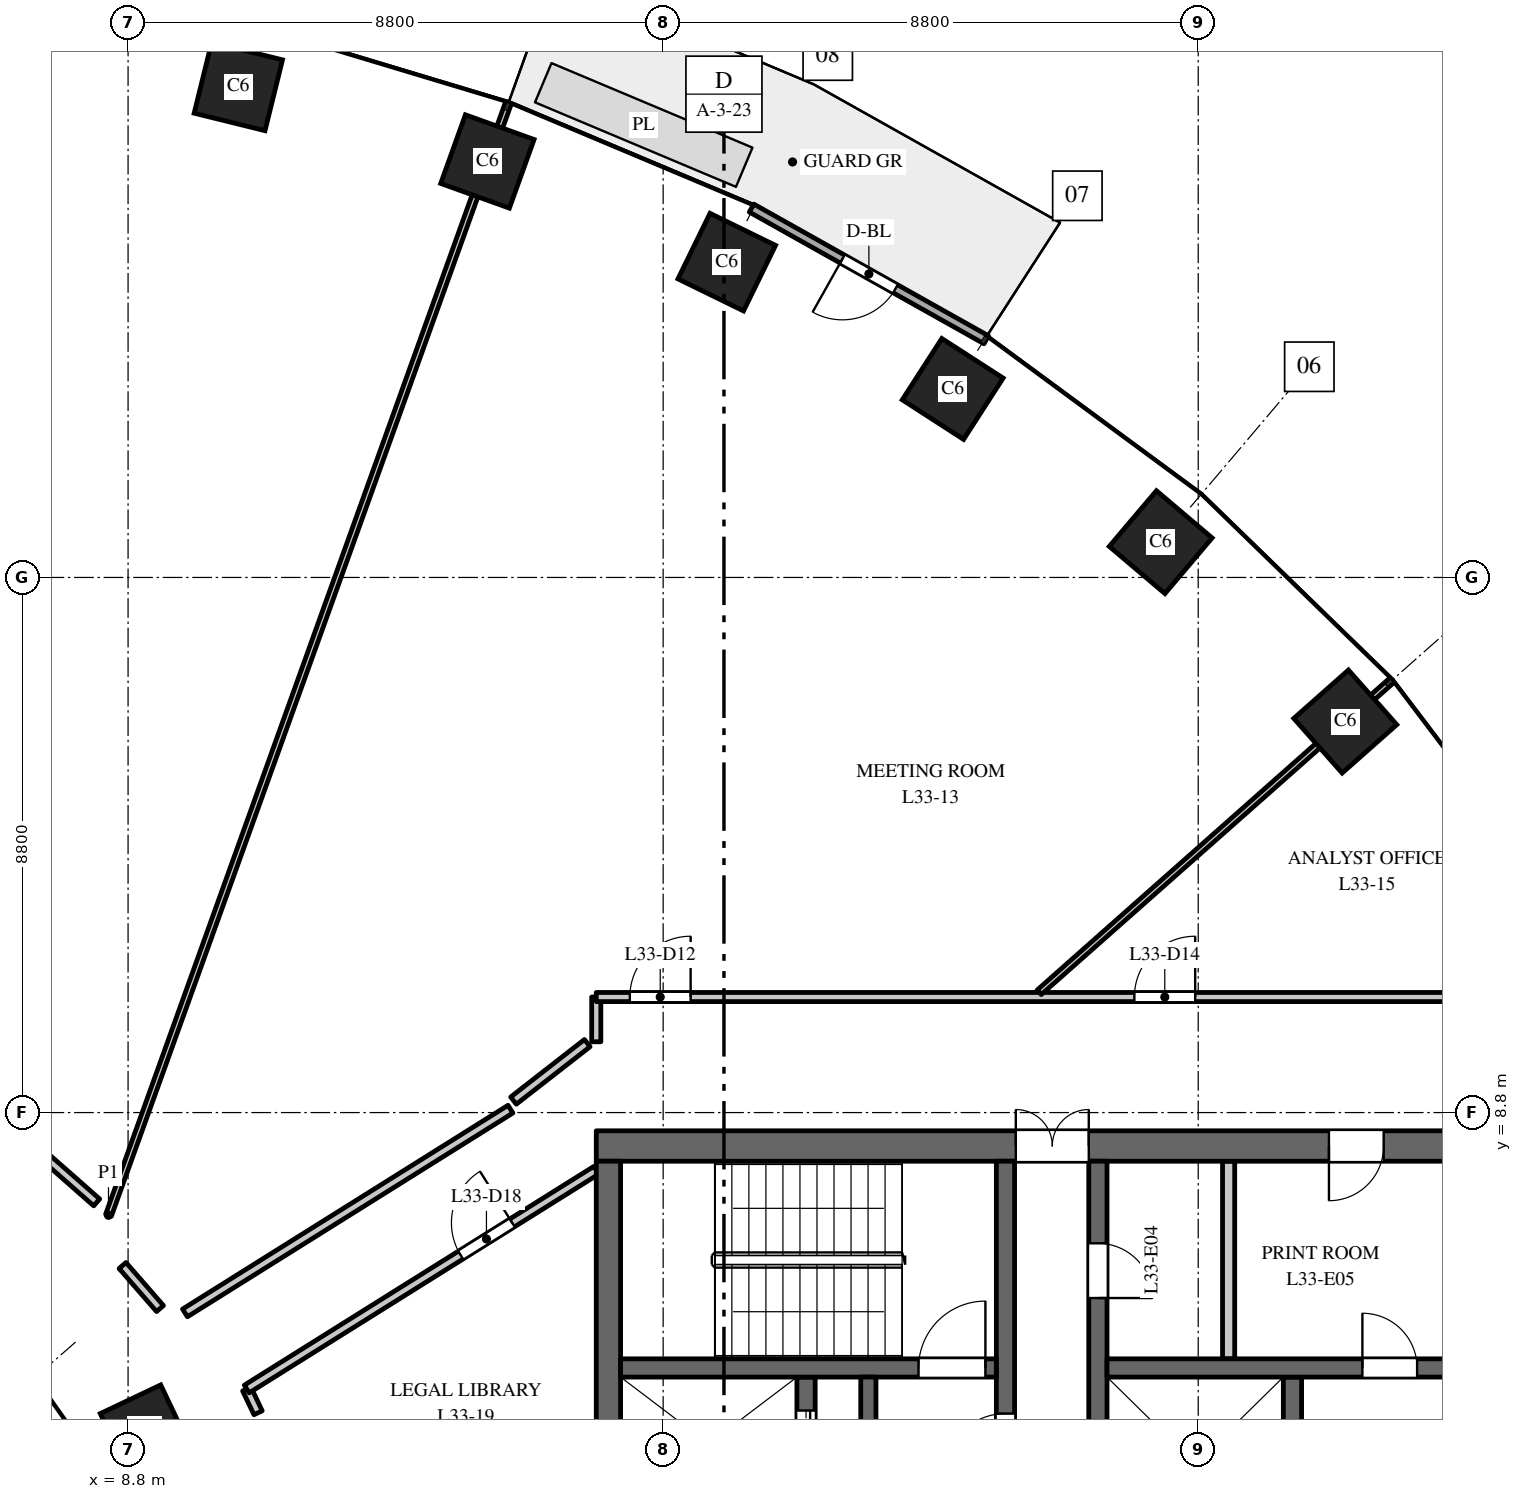
"""IFC4 building model, lengths in metres.
Left out: names, types, materials, properties, quantities, classifications, styles, units other than length and angle.
Written with IfcOpenShell. Run it as: python <this file> out.ifc"""

import sys

from ifc_helpers import new_model, si_unit, direction, frame, frame_2d, origin, origin_2d, place, context, subcontext, project, spatial, rectangle, extrude, element, fill, save


model = new_model("IFC4")
c1 = context("Model", 3, precision=1e-05, world=origin(), true_north=direction((0.0, 1.0)))
c2 = subcontext(c1, "Body", "Model", "MODEL_VIEW")
j1 = project(units=[si_unit("LENGTHUNIT", "METRE"), si_unit("PLANEANGLEUNIT", "RADIAN")], contexts=[c1])
p1 = place(None, origin())
s1 = spatial("IfcSite", under=j1, at=p1, CompositionType="ELEMENT")
p2 = place(p1, origin())
s2 = spatial("IfcBuilding", under=s1, at=p2, CompositionType="ELEMENT")
p3 = place(p2, frame((0.0, 0.0, 146.0)))
s3 = spatial("IfcBuildingStorey", under=s2, at=p3, CompositionType="ELEMENT", Elevation=146.0)
for number, where, z_axis, x_axis in (
    (1, (28.819, 15.23, 0.0), (0.0, 0.0, 1.0), (-0.663, 0.749, 0.0)),
    (2, (25.783, 18.18, 0.0), (0.0, 0.0, 1.0), (-0.763, 0.646, 0.0)),
    (3, (22.362, 20.7, 0.0), (0.0, 0.0, 1.0), (-0.84, 0.542, 0.0)),
    (4, (18.646, 22.785, 0.0), (0.0, 0.0, 1.0), (-0.898, 0.439, 0.0)),
    (5, (14.709, 24.441, 0.0), (0.0, 0.0, 1.0), (-0.941, 0.338, 0.0)),
    (6, (10.613, 25.674, 0.0), (0.0, 0.0, 1.0), (-0.971, 0.24, 0.0)),
):
    element("IfcColumn", number, at=place(p3, frame(where, z_axis=z_axis, x_axis=x_axis)), inside=s3, PredefinedType="COLUMN", context=c2, shape_type="SweptSolid", body=[
        extrude(rectangle(XDim=1.2, YDim=1.2, at=origin_2d()), origin(), (0.0, 0.0, 1.0), 4.0),
    ])
p4 = place(p3, frame((9.076, 3.588, 0.0), z_axis=(0.0, 0.0, 1.0), x_axis=(-0.428666979171, 0.903462573087, 0.0)))
e7 = element("IfcColumn", 7, at=p4, inside=s3, PredefinedType="COLUMN", context=c2, shape_type="SweptSolid", body=[
    extrude(rectangle(XDim=1.1, YDim=1.1, at=origin_2d()), origin(), (0.0, 0.0, 1.0), 4.0),
])
p5 = place(p3, frame((16.5, 8.25, 0.0), z_axis=(0.0, 0.0, 1.0), x_axis=(1.0, 0.0, 0.0)))
e8 = element("IfcWall", 8, at=p5, inside=s3, PredefinedType="SHEAR", context=c2, shape_type="SweptSolid", body=[
    extrude(rectangle(XDim=15.0, YDim=0.5, at=frame_2d((7.5, 0.0))), origin(), (0.0, 0.0, 1.0), 3.7),
])
p6 = place(p5, frame((6.9, 0.0, 0.0)))
e9 = element("IfcOpeningElement", 9, at=p6, cuts=e8, PredefinedType="OPENING", context=c2, shape_type="SweptSolid", body=[
    extrude(rectangle(XDim=1.2, YDim=2.1, at=frame_2d((0.6, 1.05))), frame((0.0, 0.26, 0.0), z_axis=(0.0, -1.0, 0.0), x_axis=(1.0, 0.0, 0.0)), (0.0, 0.0, 1.0), 0.52),
])
p7 = place(p5, frame((12.05, 0.0, 0.0)))
e10 = element("IfcOpeningElement", 10, at=p7, cuts=e8, PredefinedType="OPENING", context=c2, shape_type="SweptSolid", body=[
    extrude(rectangle(XDim=0.9, YDim=2.1, at=frame_2d((0.45, 1.05))), frame((0.0, 0.26, 0.0), z_axis=(0.0, -1.0, 0.0), x_axis=(1.0, 0.0, 0.0)), (0.0, 0.0, 1.0), 0.52),
])
p8 = place(p3, frame((27.95, -4.45, 0.0), z_axis=(0.0, 0.0, 1.0), x_axis=(0.0, 1.0, 0.0)))
e11 = element("IfcWall", 11, at=p8, inside=s3, PredefinedType="SHEAR", context=c2, shape_type="SweptSolid", body=[
    extrude(rectangle(XDim=8.9, YDim=0.3, at=frame_2d((4.45, 0.0))), origin(), (0.0, 0.0, 1.0), 3.7),
])
p9 = place(p3, frame((19.95, -4.45, 0.0), z_axis=(0.0, 0.0, 1.0), x_axis=(0.0, 1.0, 0.0)))
e12 = element("IfcWall", 12, at=p9, inside=s3, PredefinedType="SHEAR", context=c2, shape_type="SweptSolid", body=[
    extrude(rectangle(XDim=8.9, YDim=0.3, at=frame_2d((4.45, 0.0))), origin(), (0.0, 0.0, 1.0), 3.7),
])
p10 = place(p9, frame((0.775, 0.0, 0.0)))
e13 = element("IfcOpeningElement", 13, at=p10, cuts=e12, PredefinedType="OPENING", context=c2, shape_type="SweptSolid", body=[
    extrude(rectangle(XDim=1.2, YDim=2.1, at=frame_2d((0.6, 1.05))), frame((0.0, 0.16, 0.0), z_axis=(0.0, -1.0, 0.0), x_axis=(1.0, 0.0, 0.0)), (0.0, 0.0, 1.0), 0.32),
])
p11 = place(p9, frame((4.675, 0.0, 0.0)))
e14 = element("IfcOpeningElement", 14, at=p11, cuts=e12, PredefinedType="OPENING", context=c2, shape_type="SweptSolid", body=[
    extrude(rectangle(XDim=1.1, YDim=2.1, at=frame_2d((0.55, 1.05))), frame((0.0, 0.16, 0.0), z_axis=(0.0, -1.0, 0.0), x_axis=(1.0, 0.0, 0.0)), (0.0, 0.0, 1.0), 0.32),
])
p12 = place(p9, frame((7.25, 0.0, 0.0)))
e15 = element("IfcOpeningElement", 15, at=p12, cuts=e12, PredefinedType="OPENING", context=c2, shape_type="SweptSolid", body=[
    extrude(rectangle(XDim=1.1, YDim=2.1, at=frame_2d((0.55, 1.05))), frame((0.0, 0.16, 0.0), z_axis=(0.0, -1.0, 0.0), x_axis=(1.0, 0.0, 0.0)), (0.0, 0.0, 1.0), 0.32),
])
p13 = place(p3, frame((24.75, -8.0, 0.0), z_axis=(0.0, 0.0, 1.0), x_axis=(0.0, 1.0, 0.0)))
e16 = element("IfcWall", 16, at=p13, inside=s3, PredefinedType="SHEAR", context=c2, shape_type="SweptSolid", body=[
    extrude(rectangle(XDim=16.0, YDim=0.3, at=frame_2d((8.0, 0.0))), origin(), (0.0, 0.0, 1.0), 3.7),
])
p14 = place(p13, frame((4.425, 0.0, 0.0)))
e17 = element("IfcOpeningElement", 17, at=p14, cuts=e16, PredefinedType="OPENING", context=c2, shape_type="SweptSolid", body=[
    extrude(rectangle(XDim=1.1, YDim=2.1, at=frame_2d((0.55, 1.05))), frame((0.0, 0.16, 0.0), z_axis=(0.0, -1.0, 0.0), x_axis=(1.0, 0.0, 0.0)), (0.0, 0.0, 1.0), 0.32),
])
p15 = place(p13, frame((7.45, 0.0, 0.0)))
e18 = element("IfcOpeningElement", 18, at=p15, cuts=e16, PredefinedType="OPENING", context=c2, shape_type="SweptSolid", body=[
    extrude(rectangle(XDim=1.1, YDim=2.1, at=frame_2d((0.55, 1.05))), frame((0.0, 0.16, 0.0), z_axis=(0.0, -1.0, 0.0), x_axis=(1.0, 0.0, 0.0)), (0.0, 0.0, 1.0), 0.32),
])
p16 = place(p13, frame((10.475, 0.0, 0.0)))
e19 = element("IfcOpeningElement", 19, at=p16, cuts=e16, PredefinedType="OPENING", context=c2, shape_type="SweptSolid", body=[
    extrude(rectangle(XDim=1.1, YDim=2.1, at=frame_2d((0.55, 1.05))), frame((0.0, 0.16, 0.0), z_axis=(0.0, -1.0, 0.0), x_axis=(1.0, 0.0, 0.0)), (0.0, 0.0, 1.0), 0.32),
])
p17 = place(p13, frame((13.75, 0.0, 0.0)))
e20 = element("IfcOpeningElement", 20, at=p17, cuts=e16, PredefinedType="OPENING", context=c2, shape_type="SweptSolid", body=[
    extrude(rectangle(XDim=0.9, YDim=2.1, at=frame_2d((0.45, 1.05))), frame((0.0, 0.16, 0.0), z_axis=(0.0, -1.0, 0.0), x_axis=(1.0, 0.0, 0.0)), (0.0, 0.0, 1.0), 0.32),
])
p18 = place(p13, frame((1.35, 0.0, 0.0)))
e21 = element("IfcOpeningElement", 21, at=p18, cuts=e16, PredefinedType="OPENING", context=c2, shape_type="SweptSolid", body=[
    extrude(rectangle(XDim=0.9, YDim=2.1, at=frame_2d((0.45, 1.05))), frame((0.0, 0.16, 0.0), z_axis=(0.0, -1.0, 0.0), x_axis=(1.0, 0.0, 0.0)), (0.0, 0.0, 1.0), 0.32),
])
p19 = place(p3, frame((16.7, -8.0, 0.0), z_axis=(0.0, 0.0, 1.0), x_axis=(0.0, 1.0, 0.0)))
e22 = element("IfcWall", 22, at=p19, inside=s3, PredefinedType="SHEAR", context=c2, shape_type="SweptSolid", body=[
    extrude(rectangle(XDim=16.0, YDim=0.4, at=frame_2d((8.0, 0.0))), origin(), (0.0, 0.0, 1.0), 3.7),
])
p20 = place(p3, frame((24.9, 4.6, 0.0), z_axis=(0.0, 0.0, 1.0), x_axis=(1.0, 0.0, 0.0)))
e23 = element("IfcWall", 23, at=p20, inside=s3, PredefinedType="SHEAR", context=c2, shape_type="SweptSolid", body=[
    extrude(rectangle(XDim=6.1, YDim=0.3, at=frame_2d((3.05, 0.0))), origin(), (0.0, 0.0, 1.0), 3.7),
])
p21 = place(p20, frame((4.2, 0.0, 0.0)))
e24 = element("IfcOpeningElement", 24, at=p21, cuts=e23, PredefinedType="OPENING", context=c2, shape_type="SweptSolid", body=[
    extrude(rectangle(XDim=0.9, YDim=2.1, at=frame_2d((0.45, 1.05))), frame((0.0, 0.16, 0.0), z_axis=(0.0, -1.0, 0.0), x_axis=(1.0, 0.0, 0.0)), (0.0, 0.0, 1.0), 0.32),
])
p22 = place(p3, frame((26.9, 4.75, 0.0), z_axis=(0.0, 0.0, 1.0), x_axis=(0.0, 1.0, 0.0)))
e25 = element("IfcWall", 25, at=p22, inside=s3, PredefinedType="PARTITIONING", context=c2, shape_type="SweptSolid", body=[
    extrude(rectangle(XDim=3.25, YDim=0.2, at=frame_2d((1.625, 0.0))), origin(), (0.0, 0.0, 1.0), 3.7),
])
p23 = place(p3, frame((23.23, 2.25, 0.0), z_axis=(0.0, 0.0, 1.0), x_axis=(0.0, 1.0, 0.0)))
e26 = element("IfcWall", 26, at=p23, inside=s3, PredefinedType="SHEAR", context=c2, shape_type="SweptSolid", body=[
    extrude(rectangle(XDim=5.75, YDim=0.3, at=frame_2d((2.875, 0.0))), origin(), (0.0, 0.0, 1.0), 3.7),
])
p24 = place(p23, frame((0.6, 0.0, 0.0)))
e27 = element("IfcOpeningElement", 27, at=p24, cuts=e26, PredefinedType="OPENING", context=c2, shape_type="SweptSolid", body=[
    extrude(rectangle(XDim=1.0, YDim=2.1, at=frame_2d((0.5, 1.05))), frame((0.0, 0.16, 0.0), z_axis=(0.0, -1.0, 0.0), x_axis=(1.0, 0.0, 0.0)), (0.0, 0.0, 1.0), 0.32),
])
p25 = place(p3, frame((16.9, 4.6, 0.0), z_axis=(0.0, 0.0, 1.0), x_axis=(1.0, 0.0, 0.0)))
e28 = element("IfcWall", 28, at=p25, inside=s3, PredefinedType="SHEAR", context=c2, shape_type="SweptSolid", body=[
    extrude(rectangle(XDim=6.18, YDim=0.3, at=frame_2d((3.09, 0.0))), origin(), (0.0, 0.0, 1.0), 3.7),
])
p26 = place(p25, frame((4.9, 0.0, 0.0)))
e29 = element("IfcOpeningElement", 29, at=p26, cuts=e28, PredefinedType="OPENING", context=c2, shape_type="SweptSolid", body=[
    extrude(rectangle(XDim=1.1, YDim=2.1, at=frame_2d((0.55, 1.05))), frame((0.0, 0.16, 0.0), z_axis=(0.0, -1.0, 0.0), x_axis=(1.0, 0.0, 0.0)), (0.0, 0.0, 1.0), 0.32),
])
p27 = place(p3, frame((20.975, 2.25, 0.0), z_axis=(0.0, 0.0, 1.0), x_axis=(0.0, 1.0, 0.0)))
e30 = element("IfcWall", 30, at=p27, inside=s3, PredefinedType="SHEAR", context=c2, shape_type="SweptSolid", body=[
    extrude(rectangle(XDim=2.2, YDim=0.25, at=frame_2d((1.1, 0.0))), origin(), (0.0, 0.0, 1.0), 3.7),
])
p28 = place(p3, frame((22.913, 21.509, 0.0), z_axis=(0.0, 0.0, 1.0), x_axis=(-0.872046572975, 0.489422899509, 0.0)))
e31 = element("IfcWall", 31, at=p28, inside=s3, PredefinedType="STANDARD", context=c2, shape_type="SweptSolid", body=[
    extrude(rectangle(XDim=4.426, YDim=0.15, at=frame_2d((2.213, 0.0))), origin(), (0.0, 0.0, 1.0), 3.7),
])
p29 = place(p28, frame((1.713, 0.0, 0.0)))
e32 = element("IfcOpeningElement", 32, at=p29, cuts=e31, PredefinedType="OPENING", context=c2, shape_type="SweptSolid", body=[
    extrude(rectangle(XDim=1.0, YDim=2.4, at=frame_2d((0.5, 1.2))), frame((0.0, 0.085, 0.0), z_axis=(0.0, -1.0, 0.0), x_axis=(1.0, 0.0, 0.0)), (0.0, 0.0, 1.0), 0.17),
])
p30 = place(p3, frame((7.458, 8.049, 0.0), z_axis=(0.0, 0.0, 1.0), x_axis=(0.75060787095, -0.660747927782, 0.0)))
e33 = element("IfcWall", 33, at=p30, inside=s3, PredefinedType="PARTITIONING", context=c2, shape_type="SweptSolid", body=[
    extrude(rectangle(XDim=1.1, YDim=0.15, at=frame_2d((0.55, 0.0))), origin(), (0.0, 0.0, 1.0), 3.7),
])
p31 = place(p3, frame((8.478, 7.111, 0.0), z_axis=(0.0, 0.0, 1.0), x_axis=(0.338361922043, 0.941016051782, 0.0)))
e34 = element("IfcWall", 34, at=p31, inside=s3, PredefinedType="PARTITIONING", context=c2, shape_type="SweptSolid", body=[
    extrude(rectangle(XDim=19.417, YDim=0.1, at=frame_2d((9.708, 0.0))), origin(), (0.0, 0.0, 1.0), 2.85),
])
p32 = place(p3, frame((8.709, 6.285, 0.0), z_axis=(0.0, 0.0, 1.0), x_axis=(0.656365478363, -0.754443078578, 0.0)))
e35 = element("IfcWall", 35, at=p32, inside=s3, PredefinedType="PARTITIONING", context=c2, shape_type="SweptSolid", body=[
    extrude(rectangle(XDim=0.938, YDim=0.15, at=frame_2d((0.469, 0.0))), origin(), (0.0, 0.0, 1.0), 3.7),
])
p33 = place(p3, frame((9.736, 5.505, 0.0), z_axis=(0.0, 0.0, 1.0), x_axis=(0.847611500167, 0.53061732424, 0.0)))
e36 = element("IfcWall", 36, at=p33, inside=s3, PredefinedType="PARTITIONING", context=c2, shape_type="SweptSolid", body=[
    extrude(rectangle(XDim=6.315, YDim=0.15, at=frame_2d((3.158, 0.0))), origin(), (0.0, 0.0, 1.0), 3.7),
])
p34 = place(p3, frame((10.752, 4.254, 0.0), z_axis=(0.0, 0.0, 1.0), x_axis=(0.429758433873, -0.90294390109, 0.0)))
e37 = element("IfcWall", 37, at=p34, inside=s3, PredefinedType="PARTITIONING", context=c2, shape_type="SweptSolid", body=[
    extrude(rectangle(XDim=0.433, YDim=0.15, at=frame_2d((0.216, 0.0))), origin(), (0.0, 0.0, 1.0), 3.7),
])
p35 = place(p3, frame((10.752, 4.254, 0.0), z_axis=(0.0, 0.0, 1.0), x_axis=(0.847690706888, 0.530490777917, 0.0)))
e38 = element("IfcWall", 38, at=p35, inside=s3, PredefinedType="PARTITIONING", context=c2, shape_type="SweptSolid", body=[
    extrude(rectangle(XDim=6.781, YDim=0.15, at=frame_2d((3.39, 0.0))), origin(), (0.0, 0.0, 1.0), 3.7),
])
p36 = place(p35, frame((4.15, 0.0, 0.0)))
e39 = element("IfcOpeningElement", 39, at=p36, cuts=e38, PredefinedType="OPENING", context=c2, shape_type="SweptSolid", body=[
    extrude(rectangle(XDim=1.0, YDim=2.1, at=frame_2d((0.5, 1.05))), frame((0.0, 0.085, 0.0), z_axis=(0.0, -1.0, 0.0), x_axis=(1.0, 0.0, 0.0)), (0.0, 0.0, 1.0), 0.17),
])
p37 = place(p3, frame((16.5, 9.964, 0.0), z_axis=(0.0, 0.0, 1.0), x_axis=(0.0, 1.0, 0.0)))
e40 = element("IfcWall", 40, at=p37, inside=s3, PredefinedType="PARTITIONING", context=c2, shape_type="SweptSolid", body=[
    extrude(rectangle(XDim=0.736, YDim=0.15, at=frame_2d((0.368, 0.0))), origin(), (0.0, 0.0, 1.0), 3.7),
])
p38 = place(p3, frame((16.5, 10.7, 0.0), z_axis=(0.0, 0.0, 1.0), x_axis=(1.0, 0.0, 0.0)))
e41 = element("IfcWall", 41, at=p38, inside=s3, PredefinedType="PARTITIONING", context=c2, shape_type="SweptSolid", body=[
    extrude(rectangle(XDim=15.0, YDim=0.15, at=frame_2d((7.5, 0.0))), origin(), (0.0, 0.0, 1.0), 2.75),
])
p39 = place(p38, frame((0.552, 0.0, 0.0)))
e42 = element("IfcOpeningElement", 42, at=p39, cuts=e41, PredefinedType="OPENING", context=c2, shape_type="SweptSolid", body=[
    extrude(rectangle(XDim=1.0, YDim=2.1, at=frame_2d((0.5, 1.05))), frame((0.0, 0.085, 0.0), z_axis=(0.0, -1.0, 0.0), x_axis=(1.0, 0.0, 0.0)), (0.0, 0.0, 1.0), 0.17),
])
p40 = place(p38, frame((8.85, 0.0, 0.0)))
e43 = element("IfcOpeningElement", 43, at=p40, cuts=e41, PredefinedType="OPENING", context=c2, shape_type="SweptSolid", body=[
    extrude(rectangle(XDim=1.0, YDim=2.1, at=frame_2d((0.5, 1.05))), frame((0.0, 0.085, 0.0), z_axis=(0.0, -1.0, 0.0), x_axis=(1.0, 0.0, 0.0)), (0.0, 0.0, 1.0), 0.17),
])
p41 = place(p3, frame((23.785, 10.778, 0.0), z_axis=(0.0, 0.0, 1.0), x_axis=(0.748985701008, 0.662586160198, 0.0)))
e44 = element("IfcWall", 44, at=p41, inside=s3, PredefinedType="PARTITIONING", context=c2, shape_type="SweptSolid", body=[
    extrude(rectangle(XDim=7.723, YDim=0.1, at=frame_2d((3.861, 0.0))), origin(), (0.0, 0.0, 1.0), 3.7),
])
p42 = place(p3, frame((15.139, 8.997, 0.0), z_axis=(0.0, 0.0, 1.0), x_axis=(0.788950226826, 0.614457109643, 0.0)))
e45 = element("IfcWall", 45, at=p42, inside=s3, PredefinedType="PARTITIONING", context=c2, shape_type="SweptSolid", body=[
    extrude(rectangle(XDim=1.538, YDim=0.15, at=frame_2d((0.769, 0.0))), origin(), (0.0, 0.0, 1.0), 3.7),
])
p43 = place(p12, origin())
e46 = element("IfcDoor", 46, at=p43, inside=s3, OperationType="DOUBLE_DOOR_SLIDING", PredefinedType="DOOR", context=c2, shape_type="SweptSolid", body=[
    extrude(rectangle(XDim=1.1, YDim=2.1, at=frame_2d((0.55, 1.05))), frame((0.0, 0.025, 0.0), z_axis=(0.0, -1.0, 0.0), x_axis=(1.0, 0.0, 0.0)), (0.0, 0.0, 1.0), 0.05),
])
fill(e15, e46)
p44 = place(p26, origin())
e47 = element("IfcDoor", 47, at=p44, inside=s3, OperationType="SINGLE_SWING_LEFT", PredefinedType="DOOR", context=c2, shape_type="SweptSolid", body=[
    extrude(rectangle(XDim=1.1, YDim=2.1, at=frame_2d((0.55, 1.05))), frame((0.0, 0.025, 0.0), z_axis=(0.0, -1.0, 0.0), x_axis=(1.0, 0.0, 0.0)), (0.0, 0.0, 1.0), 0.05),
])
fill(e29, e47)
p45 = place(p24, origin())
e48 = element("IfcDoor", 48, at=p45, inside=s3, OperationType="SINGLE_SWING_RIGHT", PredefinedType="DOOR", context=c2, shape_type="SweptSolid", body=[
    extrude(rectangle(XDim=1.0, YDim=2.1, at=frame_2d((0.5, 1.05))), frame((0.0, 0.025, 0.0), z_axis=(0.0, -1.0, 0.0), x_axis=(1.0, 0.0, 0.0)), (0.0, 0.0, 1.0), 0.05),
])
fill(e27, e48)
p46 = place(p6, origin())
e49 = element("IfcDoor", 49, at=p46, inside=s3, OperationType="DOUBLE_DOOR_DOUBLE_SWING", PredefinedType="DOOR", context=c2, shape_type="SweptSolid", body=[
    extrude(rectangle(XDim=1.2, YDim=2.1, at=frame_2d((0.6, 1.05))), frame((0.0, 0.025, 0.0), z_axis=(0.0, -1.0, 0.0), x_axis=(1.0, 0.0, 0.0)), (0.0, 0.0, 1.0), 0.05),
])
fill(e9, e49)
p47 = place(p17, origin())
e50 = element("IfcDoor", 50, at=p47, inside=s3, OperationType="SINGLE_SWING_LEFT", PredefinedType="DOOR", context=c2, shape_type="SweptSolid", body=[
    extrude(rectangle(XDim=0.9, YDim=2.1, at=frame_2d((0.45, 1.05))), frame((0.0, 0.025, 0.0), z_axis=(0.0, -1.0, 0.0), x_axis=(1.0, 0.0, 0.0)), (0.0, 0.0, 1.0), 0.05),
])
fill(e20, e50)
p48 = place(p7, origin())
e51 = element("IfcDoor", 51, at=p48, inside=s3, OperationType="SINGLE_SWING_LEFT", PredefinedType="DOOR", context=c2, shape_type="SweptSolid", body=[
    extrude(rectangle(XDim=0.9, YDim=2.1, at=frame_2d((0.45, 1.05))), frame((0.0, 0.025, 0.0), z_axis=(0.0, -1.0, 0.0), x_axis=(1.0, 0.0, 0.0)), (0.0, 0.0, 1.0), 0.05),
])
fill(e10, e51)
p49 = place(p21, origin())
e52 = element("IfcDoor", 52, at=p49, inside=s3, OperationType="SINGLE_SWING_RIGHT", PredefinedType="DOOR", context=c2, shape_type="SweptSolid", body=[
    extrude(rectangle(XDim=0.9, YDim=2.1, at=frame_2d((0.45, 1.05))), frame((0.0, 0.025, 0.0), z_axis=(0.0, -1.0, 0.0), x_axis=(1.0, 0.0, 0.0)), (0.0, 0.0, 1.0), 0.05),
])
fill(e24, e52)
p50 = place(p29, origin())
e53 = element("IfcDoor", 53, at=p50, inside=s3, OperationType="SINGLE_SWING_RIGHT", PredefinedType="DOOR", context=c2, shape_type="SweptSolid", body=[
    extrude(rectangle(XDim=1.0, YDim=2.4, at=frame_2d((0.5, 1.2))), frame((0.0, 0.025, 0.0), z_axis=(0.0, -1.0, 0.0), x_axis=(1.0, 0.0, 0.0)), (0.0, 0.0, 1.0), 0.05),
])
fill(e32, e53)
p51 = place(p39, origin())
e54 = element("IfcDoor", 54, at=p51, inside=s3, OperationType="SINGLE_SWING_RIGHT", PredefinedType="DOOR", context=c2, shape_type="SweptSolid", body=[
    extrude(rectangle(XDim=1.0, YDim=2.1, at=frame_2d((0.5, 1.05))), frame((0.0, 0.025, 0.0), z_axis=(0.0, -1.0, 0.0), x_axis=(1.0, 0.0, 0.0)), (0.0, 0.0, 1.0), 0.05),
])
fill(e42, e54)
p52 = place(p40, origin())
e55 = element("IfcDoor", 55, at=p52, inside=s3, OperationType="SINGLE_SWING_RIGHT", PredefinedType="DOOR", context=c2, shape_type="SweptSolid", body=[
    extrude(rectangle(XDim=1.0, YDim=2.1, at=frame_2d((0.5, 1.05))), frame((0.0, 0.025, 0.0), z_axis=(0.0, -1.0, 0.0), x_axis=(1.0, 0.0, 0.0)), (0.0, 0.0, 1.0), 0.05),
])
fill(e43, e55)
p53 = place(p36, origin())
e56 = element("IfcDoor", 56, at=p53, inside=s3, OperationType="SINGLE_SWING_RIGHT", PredefinedType="DOOR", context=c2, shape_type="SweptSolid", body=[
    extrude(rectangle(XDim=1.0, YDim=2.1, at=frame_2d((0.5, 1.05))), frame((0.0, 0.025, 0.0), z_axis=(0.0, -1.0, 0.0), x_axis=(1.0, 0.0, 0.0)), (0.0, 0.0, 1.0), 0.05),
])
fill(e39, e56)
save(model, sys.argv[1])
